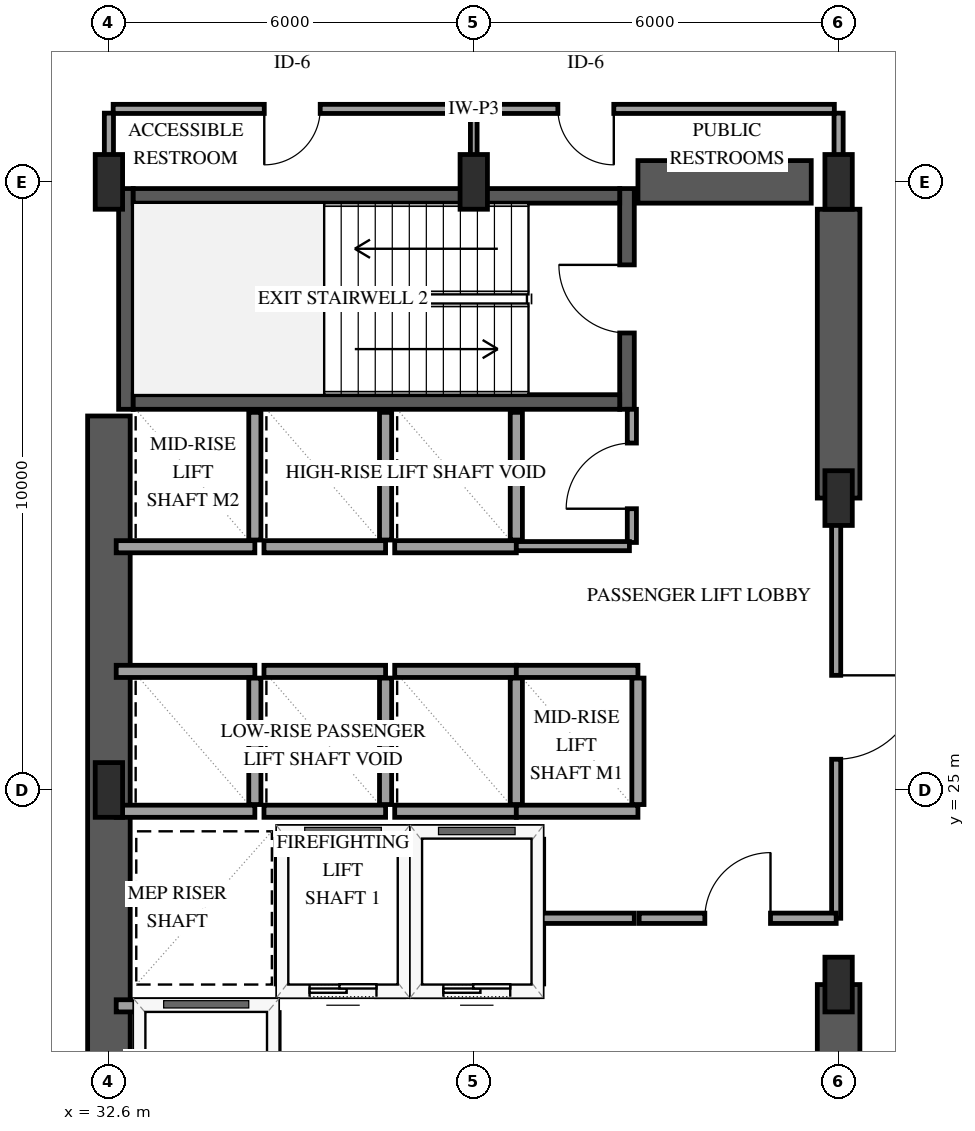
"""IFC4 building model, lengths in metres.
Left out: names, types, materials, properties, quantities, classifications, styles, units other than length and angle.
Written with IfcOpenShell. Run it as: python <this file> out.ifc"""

import sys

from ifc_helpers import new_model, si_unit, direction, frame, frame_2d, origin, origin_2d, place, context, subcontext, project, spatial, rectangle, extrude, element, fill, save


model = new_model("IFC4")
c1 = context("Model", 3, precision=1e-05, world=origin(), true_north=direction((0.0, 1.0)))
c2 = subcontext(c1, "Body", "Model", "MODEL_VIEW")
j1 = project(units=[si_unit("LENGTHUNIT", "METRE"), si_unit("PLANEANGLEUNIT", "RADIAN")], contexts=[c1])
p1 = place(None, origin())
s1 = spatial("IfcSite", under=j1, at=p1, CompositionType="ELEMENT")
p2 = place(p1, origin())
s2 = spatial("IfcBuilding", under=s1, at=p2, CompositionType="ELEMENT")
p3 = place(p2, frame((0.0, 0.0, 16.2)))
s3 = spatial("IfcBuildingStorey", under=s2, at=p3, CompositionType="ELEMENT", Elevation=16.2)
p4 = place(p3, frame((32.88, 31.26, 0.0), z_axis=(0.0, 0.0, 1.0), x_axis=(0.0, 1.0, 0.0)))
e1 = element("IfcWall", 1, at=p4, inside=s3, PredefinedType="SHEAR", context=c2, shape_type="SweptSolid", body=[
    extrude(rectangle(XDim=3.63, YDim=0.24, at=frame_2d((1.815, 0.0))), origin(), (0.0, 0.0, 1.0), 4.5),
])
p5 = place(p3, frame((41.12, 31.26, 0.0), z_axis=(0.0, 0.0, 1.0), x_axis=(0.0, 1.0, 0.0)))
e2 = element("IfcWall", 2, at=p5, inside=s3, PredefinedType="SHEAR", context=c2, shape_type="SweptSolid", body=[
    extrude(rectangle(XDim=3.63, YDim=0.24, at=frame_2d((1.815, 0.0))), origin(), (0.0, 0.0, 1.0), 4.5),
])
p6 = place(p5, frame((1.255, 0.0, 0.0)))
e3 = element("IfcOpeningElement", 3, at=p6, cuts=e2, PredefinedType="OPENING", context=c2, shape_type="SweptSolid", body=[
    extrude(rectangle(XDim=1.12, YDim=2.15, at=frame_2d((0.56, 1.075))), frame((0.0, 0.13, 0.0), z_axis=(0.0, -1.0, 0.0), x_axis=(1.0, 0.0, 0.0)), (0.0, 0.0, 1.0), 0.26),
])
for number, where, z_axis, x_axis in (
    (4, (33.0, 31.38, 0.0), (0.0, 0.0, 1.0), (1.0, 0.0, 0.0)),
    (5, (33.0, 34.77, 0.0), (0.0, 0.0, 1.0), (1.0, 0.0, 0.0)),
):
    element("IfcWall", number, at=place(p3, frame(where, z_axis=z_axis, x_axis=x_axis)), inside=s3, PredefinedType="SHEAR", context=c2, shape_type="SweptSolid", body=[
        extrude(rectangle(XDim=8.0, YDim=0.24, at=frame_2d((4.0, 0.0))), origin(), (0.0, 0.0, 1.0), 4.5),
    ])
p7 = place(p3, frame((32.6, 18.85, 0.0), z_axis=(0.0, 0.0, 1.0), x_axis=(0.0, 1.0, 0.0)))
e6 = element("IfcWall", 6, at=p7, inside=s3, PredefinedType="SHEAR", context=c2, shape_type="SweptSolid", body=[
    extrude(rectangle(XDim=12.3, YDim=0.7, at=frame_2d((6.15, 0.0))), origin(), (0.0, 0.0, 1.0), 4.5),
])
p8 = place(p3, frame((41.3, 35.0, 0.0), z_axis=(0.0, 0.0, 1.0), x_axis=(1.0, 0.0, 0.0)))
e7 = element("IfcWall", 7, at=p8, inside=s3, PredefinedType="SHEAR", context=c2, shape_type="SweptSolid", body=[
    extrude(rectangle(XDim=2.85, YDim=0.7, at=frame_2d((1.425, 0.0))), origin(), (0.0, 0.0, 1.0), 4.5),
])
p9 = place(p3, frame((44.6, 15.45, 0.0), z_axis=(0.0, 0.0, 1.0), x_axis=(0.0, 1.0, 0.0)))
e8 = element("IfcWall", 8, at=p9, inside=s3, PredefinedType="SHEAR", context=c2, shape_type="SweptSolid", body=[
    extrude(rectangle(XDim=6.35, YDim=0.7, at=frame_2d((3.175, 0.0))), origin(), (0.0, 0.0, 1.0), 4.5),
])
p10 = place(p3, frame((44.6, 29.8, 0.0), z_axis=(0.0, 0.0, 1.0), x_axis=(0.0, 1.0, 0.0)))
e9 = element("IfcWall", 9, at=p10, inside=s3, PredefinedType="SHEAR", context=c2, shape_type="SweptSolid", body=[
    extrude(rectangle(XDim=4.75, YDim=0.7, at=frame_2d((2.375, 0.0))), origin(), (0.0, 0.0, 1.0), 4.5),
])
for number, where, z_axis, x_axis in (
    (10, (32.6, 25.0, 0.0), (0.0, 0.0, 1.0), (1.0, 0.0, 0.0)),
    (11, (32.6, 35.0, 0.0), (0.0, 0.0, 1.0), (1.0, 0.0, 0.0)),
    (12, (38.6, 35.0, 0.0), (0.0, 0.0, 1.0), (1.0, 0.0, 0.0)),
    (13, (44.6, 21.8, 0.0), (0.0, 0.0, 1.0), (1.0, 0.0, 0.0)),
    (14, (44.6, 29.8, 0.0), (0.0, 0.0, 1.0), (1.0, 0.0, 0.0)),
    (15, (44.6, 35.0, 0.0), (0.0, 0.0, 1.0), (1.0, 0.0, 0.0)),
):
    element("IfcColumn", number, at=place(p3, frame(where, z_axis=z_axis, x_axis=x_axis)), inside=s3, PredefinedType="PILASTER", context=c2, shape_type="SweptSolid", body=[
        extrude(rectangle(XDim=0.45, YDim=0.9, at=origin_2d()), origin(), (0.0, 0.0, 1.0), 4.5),
    ])
p11 = place(p3, frame((35.45, 21.7, 0.0), z_axis=(0.0, 0.0, 1.0), x_axis=(1.0, 0.0, 0.0)))
e16 = element("IfcWall", 16, at=p11, inside=s3, PredefinedType="SOLIDWALL", context=c2, shape_type="SweptSolid", body=[
    extrude(rectangle(XDim=2.0, YDim=0.2, at=frame_2d((1.0, 0.0))), origin(), (0.0, 0.0, 1.0), 4.18),
])
p12 = place(p11, frame((0.45, 0.0, 0.0)))
e17 = element("IfcOpeningElement", 17, at=p12, cuts=e16, PredefinedType="OPENING", context=c2, shape_type="SweptSolid", body=[
    extrude(rectangle(XDim=1.1, YDim=2.15, at=frame_2d((0.55, 1.075))), frame((0.0, 0.11, 0.0), z_axis=(0.0, -1.0, 0.0), x_axis=(1.0, 0.0, 0.0)), (0.0, 0.0, 1.0), 0.22),
])
p13 = place(p3, frame((35.45, 24.3, 0.0), z_axis=(0.0, 0.0, 1.0), x_axis=(1.0, 0.0, 0.0)))
e18 = element("IfcWall", 18, at=p13, inside=s3, PredefinedType="SOLIDWALL", context=c2, shape_type="SweptSolid", body=[
    extrude(rectangle(XDim=2.0, YDim=0.2, at=frame_2d((1.0, 0.0))), origin(), (0.0, 0.0, 1.0), 4.18),
])
for number, where, z_axis, x_axis in (
    (19, (35.45, 21.81, 0.0), (0.0, 0.0, 1.0), (0.0, 1.0, 0.0)),
    (20, (37.45, 21.81, 0.0), (0.0, 0.0, 1.0), (0.0, 1.0, 0.0)),
):
    element("IfcWall", number, at=place(p3, frame(where, z_axis=z_axis, x_axis=x_axis)), inside=s3, PredefinedType="SOLIDWALL", context=c2, shape_type="SweptSolid", body=[
        extrude(rectangle(XDim=2.38, YDim=0.2, at=frame_2d((1.19, 0.0))), origin(), (0.0, 0.0, 1.0), 4.18),
    ])
p14 = place(p3, frame((37.65, 21.7, 0.0), z_axis=(0.0, 0.0, 1.0), x_axis=(1.0, 0.0, 0.0)))
e21 = element("IfcWall", 21, at=p14, inside=s3, PredefinedType="SOLIDWALL", context=c2, shape_type="SweptSolid", body=[
    extrude(rectangle(XDim=2.0, YDim=0.2, at=frame_2d((1.0, 0.0))), origin(), (0.0, 0.0, 1.0), 4.18),
])
p15 = place(p14, frame((0.45, 0.0, 0.0)))
e22 = element("IfcOpeningElement", 22, at=p15, cuts=e21, PredefinedType="OPENING", context=c2, shape_type="SweptSolid", body=[
    extrude(rectangle(XDim=1.1, YDim=2.15, at=frame_2d((0.55, 1.075))), frame((0.0, 0.11, 0.0), z_axis=(0.0, -1.0, 0.0), x_axis=(1.0, 0.0, 0.0)), (0.0, 0.0, 1.0), 0.22),
])
p16 = place(p3, frame((37.65, 24.3, 0.0), z_axis=(0.0, 0.0, 1.0), x_axis=(1.0, 0.0, 0.0)))
e23 = element("IfcWall", 23, at=p16, inside=s3, PredefinedType="SOLIDWALL", context=c2, shape_type="SweptSolid", body=[
    extrude(rectangle(XDim=2.0, YDim=0.2, at=frame_2d((1.0, 0.0))), origin(), (0.0, 0.0, 1.0), 4.18),
])
p17 = place(p3, frame((39.65, 21.81, 0.0), z_axis=(0.0, 0.0, 1.0), x_axis=(0.0, 1.0, 0.0)))
e24 = element("IfcWall", 24, at=p17, inside=s3, PredefinedType="SOLIDWALL", context=c2, shape_type="SweptSolid", body=[
    extrude(rectangle(XDim=2.38, YDim=0.2, at=frame_2d((1.19, 0.0))), origin(), (0.0, 0.0, 1.0), 4.18),
])
p18 = place(p3, frame((32.72, 21.45, 0.0), z_axis=(0.0, 0.0, 1.0), x_axis=(1.0, 0.0, 0.0)))
e25 = element("IfcWall", 25, at=p18, inside=s3, PredefinedType="SOLIDWALL", context=c2, shape_type="SweptSolid", body=[
    extrude(rectangle(XDim=2.58, YDim=0.2, at=frame_2d((1.29, 0.0))), origin(), (0.0, 0.0, 1.0), 4.18),
])
p19 = place(p3, frame((35.3, 18.79, 0.0), z_axis=(0.0, 0.0, 1.0), x_axis=(0.0, 1.0, 0.0)))
e26 = element("IfcWall", 26, at=p19, inside=s3, PredefinedType="SOLIDWALL", context=c2, shape_type="SweptSolid", body=[
    extrude(rectangle(XDim=2.55, YDim=0.2, at=frame_2d((1.275, 0.0))), origin(), (0.0, 0.0, 1.0), 4.18),
])
p20 = place(p19, frame((0.725, 0.0, 0.0)))
e27 = element("IfcOpeningElement", 27, at=p20, cuts=e26, PredefinedType="OPENING", context=c2, shape_type="SweptSolid", body=[
    extrude(rectangle(XDim=1.1, YDim=2.15, at=frame_2d((0.55, 1.075))), frame((0.0, 0.11, 0.0), z_axis=(0.0, -1.0, 0.0), x_axis=(1.0, 0.0, 0.0)), (0.0, 0.0, 1.0), 0.22),
])
for number, where, z_axis, x_axis in (
    (28, (32.72, 24.65, 0.0), (0.0, 0.0, 1.0), (1.0, 0.0, 0.0)),
    (29, (32.72, 26.95, 0.0), (0.0, 0.0, 1.0), (1.0, 0.0, 0.0)),
):
    element("IfcWall", number, at=place(p3, frame(where, z_axis=z_axis, x_axis=x_axis)), inside=s3, PredefinedType="SOLIDWALL", context=c2, shape_type="SweptSolid", body=[
        extrude(rectangle(XDim=2.28, YDim=0.2, at=frame_2d((1.14, 0.0))), origin(), (0.0, 0.0, 1.0), 4.18),
    ])
p21 = place(p3, frame((35.0, 24.76, 0.0), z_axis=(0.0, 0.0, 1.0), x_axis=(0.0, 1.0, 0.0)))
e30 = element("IfcWall", 30, at=p21, inside=s3, PredefinedType="SOLIDWALL", context=c2, shape_type="SweptSolid", body=[
    extrude(rectangle(XDim=2.08, YDim=0.2, at=frame_2d((1.04, 0.0))), origin(), (0.0, 0.0, 1.0), 4.18),
])
for number, where, z_axis, x_axis in (
    (31, (35.15, 24.65, 0.0), (0.0, 0.0, 1.0), (1.0, 0.0, 0.0)),
    (32, (35.15, 26.95, 0.0), (0.0, 0.0, 1.0), (1.0, 0.0, 0.0)),
):
    element("IfcWall", number, at=place(p3, frame(where, z_axis=z_axis, x_axis=x_axis)), inside=s3, PredefinedType="SOLIDWALL", context=c2, shape_type="SweptSolid", body=[
        extrude(rectangle(XDim=2.0, YDim=0.2, at=frame_2d((1.0, 0.0))), origin(), (0.0, 0.0, 1.0), 4.18),
    ])
p22 = place(p3, frame((37.15, 24.76, 0.0), z_axis=(0.0, 0.0, 1.0), x_axis=(0.0, 1.0, 0.0)))
e33 = element("IfcWall", 33, at=p22, inside=s3, PredefinedType="SOLIDWALL", context=c2, shape_type="SweptSolid", body=[
    extrude(rectangle(XDim=2.08, YDim=0.2, at=frame_2d((1.04, 0.0))), origin(), (0.0, 0.0, 1.0), 4.18),
])
for number, where, z_axis, x_axis in (
    (34, (37.3, 24.65, 0.0), (0.0, 0.0, 1.0), (1.0, 0.0, 0.0)),
    (35, (37.3, 26.95, 0.0), (0.0, 0.0, 1.0), (1.0, 0.0, 0.0)),
):
    element("IfcWall", number, at=place(p3, frame(where, z_axis=z_axis, x_axis=x_axis)), inside=s3, PredefinedType="SOLIDWALL", context=c2, shape_type="SweptSolid", body=[
        extrude(rectangle(XDim=2.0, YDim=0.2, at=frame_2d((1.0, 0.0))), origin(), (0.0, 0.0, 1.0), 4.18),
    ])
p23 = place(p3, frame((39.3, 24.76, 0.0), z_axis=(0.0, 0.0, 1.0), x_axis=(0.0, 1.0, 0.0)))
e36 = element("IfcWall", 36, at=p23, inside=s3, PredefinedType="SOLIDWALL", context=c2, shape_type="SweptSolid", body=[
    extrude(rectangle(XDim=2.08, YDim=0.2, at=frame_2d((1.04, 0.0))), origin(), (0.0, 0.0, 1.0), 4.18),
])
for number, where, z_axis, x_axis in (
    (37, (39.3, 24.65, 0.0), (0.0, 0.0, 1.0), (1.0, 0.0, 0.0)),
    (38, (39.3, 26.95, 0.0), (0.0, 0.0, 1.0), (1.0, 0.0, 0.0)),
):
    element("IfcWall", number, at=place(p3, frame(where, z_axis=z_axis, x_axis=x_axis)), inside=s3, PredefinedType="SOLIDWALL", context=c2, shape_type="SweptSolid", body=[
        extrude(rectangle(XDim=2.0, YDim=0.2, at=frame_2d((1.0, 0.0))), origin(), (0.0, 0.0, 1.0), 4.18),
    ])
p24 = place(p3, frame((41.3, 24.76, 0.0), z_axis=(0.0, 0.0, 1.0), x_axis=(0.0, 1.0, 0.0)))
e39 = element("IfcWall", 39, at=p24, inside=s3, PredefinedType="SOLIDWALL", context=c2, shape_type="SweptSolid", body=[
    extrude(rectangle(XDim=2.08, YDim=0.2, at=frame_2d((1.04, 0.0))), origin(), (0.0, 0.0, 1.0), 4.18),
])
p25 = place(p3, frame((32.72, 29.0, 0.0), z_axis=(0.0, 0.0, 1.0), x_axis=(1.0, 0.0, 0.0)))
e40 = element("IfcWall", 40, at=p25, inside=s3, PredefinedType="SOLIDWALL", context=c2, shape_type="SweptSolid", body=[
    extrude(rectangle(XDim=2.28, YDim=0.2, at=frame_2d((1.14, 0.0))), origin(), (0.0, 0.0, 1.0), 4.18),
])
p26 = place(p3, frame((35.0, 29.11, 0.0), z_axis=(0.0, 0.0, 1.0), x_axis=(0.0, 1.0, 0.0)))
e41 = element("IfcWall", 41, at=p26, inside=s3, PredefinedType="SOLIDWALL", context=c2, shape_type="SweptSolid", body=[
    extrude(rectangle(XDim=2.1, YDim=0.2, at=frame_2d((1.05, 0.0))), origin(), (0.0, 0.0, 1.0), 4.18),
])
p27 = place(p3, frame((35.15, 29.0, 0.0), z_axis=(0.0, 0.0, 1.0), x_axis=(1.0, 0.0, 0.0)))
e42 = element("IfcWall", 42, at=p27, inside=s3, PredefinedType="SOLIDWALL", context=c2, shape_type="SweptSolid", body=[
    extrude(rectangle(XDim=2.0, YDim=0.2, at=frame_2d((1.0, 0.0))), origin(), (0.0, 0.0, 1.0), 4.18),
])
p28 = place(p3, frame((37.15, 29.11, 0.0), z_axis=(0.0, 0.0, 1.0), x_axis=(0.0, 1.0, 0.0)))
e43 = element("IfcWall", 43, at=p28, inside=s3, PredefinedType="SOLIDWALL", context=c2, shape_type="SweptSolid", body=[
    extrude(rectangle(XDim=2.1, YDim=0.2, at=frame_2d((1.05, 0.0))), origin(), (0.0, 0.0, 1.0), 4.18),
])
p29 = place(p3, frame((37.3, 29.0, 0.0), z_axis=(0.0, 0.0, 1.0), x_axis=(1.0, 0.0, 0.0)))
e44 = element("IfcWall", 44, at=p29, inside=s3, PredefinedType="SOLIDWALL", context=c2, shape_type="SweptSolid", body=[
    extrude(rectangle(XDim=2.0, YDim=0.2, at=frame_2d((1.0, 0.0))), origin(), (0.0, 0.0, 1.0), 4.18),
])
p30 = place(p3, frame((39.3, 29.11, 0.0), z_axis=(0.0, 0.0, 1.0), x_axis=(0.0, 1.0, 0.0)))
e45 = element("IfcWall", 45, at=p30, inside=s3, PredefinedType="SOLIDWALL", context=c2, shape_type="SweptSolid", body=[
    extrude(rectangle(XDim=2.1, YDim=0.2, at=frame_2d((1.05, 0.0))), origin(), (0.0, 0.0, 1.0), 4.18),
])
p31 = place(p3, frame((44.56, 29.8, 0.0), z_axis=(0.0, 0.0, 1.0), x_axis=(0.0, -1.0, 0.0)))
e46 = element("IfcWall", 46, at=p31, inside=s3, PredefinedType="PARTITIONING", context=c2, shape_type="SweptSolid", body=[
    extrude(rectangle(XDim=6.91, YDim=0.15, at=frame_2d((3.455, 0.0))), origin(), (0.0, 0.0, 1.0), 3.22),
])
p32 = place(p31, frame((2.915, 0.0, 0.0)))
e47 = element("IfcOpeningElement", 47, at=p32, cuts=e46, PredefinedType="OPENING", context=c2, shape_type="SweptSolid", body=[
    extrude(rectangle(XDim=1.38, YDim=2.2, at=frame_2d((0.69, 1.1))), frame((0.0, 0.085, 0.0), z_axis=(0.0, -1.0, 0.0), x_axis=(1.0, 0.0, 0.0)), (0.0, 0.0, 1.0), 0.17),
])
p33 = place(p3, frame((38.53, 36.2, 0.0), z_axis=(0.0, 0.0, 1.0), x_axis=(-1.0, 0.0, 0.0)))
e48 = element("IfcWall", 48, at=p33, inside=s3, PredefinedType="PARTITIONING", context=c2, shape_type="SweptSolid", body=[
    extrude(rectangle(XDim=5.86, YDim=0.15, at=frame_2d((2.93, 0.0))), origin(), (0.0, 0.0, 1.0), 4.18),
])
p34 = place(p33, frame((2.455, 0.0, 0.0)))
e49 = element("IfcOpeningElement", 49, at=p34, cuts=e48, PredefinedType="OPENING", context=c2, shape_type="SweptSolid", body=[
    extrude(rectangle(XDim=0.92, YDim=2.12, at=frame_2d((0.46, 1.06))), frame((0.0, 0.085, 0.0), z_axis=(0.0, -1.0, 0.0), x_axis=(1.0, 0.0, 0.0)), (0.0, 0.0, 1.0), 0.17),
])
p35 = place(p3, frame((44.53, 36.2, 0.0), z_axis=(0.0, 0.0, 1.0), x_axis=(-1.0, 0.0, 0.0)))
e50 = element("IfcWall", 50, at=p35, inside=s3, PredefinedType="PARTITIONING", context=c2, shape_type="SweptSolid", body=[
    extrude(rectangle(XDim=5.86, YDim=0.15, at=frame_2d((2.93, 0.0))), origin(), (0.0, 0.0, 1.0), 4.18),
])
p36 = place(p35, frame((3.627, 0.0, 0.0)))
e51 = element("IfcOpeningElement", 51, at=p36, cuts=e50, PredefinedType="OPENING", context=c2, shape_type="SweptSolid", body=[
    extrude(rectangle(XDim=0.92, YDim=2.12, at=frame_2d((0.46, 1.06))), frame((0.0, 0.085, 0.0), z_axis=(0.0, -1.0, 0.0), x_axis=(1.0, 0.0, 0.0)), (0.0, 0.0, 1.0), 0.17),
])
p37 = place(p3, frame((41.32, 22.89, 0.0), z_axis=(0.0, 0.0, 1.0), x_axis=(1.0, 0.0, 0.0)))
e52 = element("IfcWall", 52, at=p37, inside=s3, PredefinedType="PARTITIONING", context=c2, shape_type="SweptSolid", body=[
    extrude(rectangle(XDim=3.24, YDim=0.17, at=frame_2d((1.62, 0.0))), origin(), (0.0, 0.0, 1.0), 4.18),
])
p38 = place(p37, frame((1.08, 0.0, 0.0)))
e53 = element("IfcOpeningElement", 53, at=p38, cuts=e52, PredefinedType="OPENING", context=c2, shape_type="SweptSolid", body=[
    extrude(rectangle(XDim=1.08, YDim=2.15, at=frame_2d((0.54, 1.075))), frame((0.0, 0.095, 0.0), z_axis=(0.0, -1.0, 0.0), x_axis=(1.0, 0.0, 0.0)), (0.0, 0.0, 1.0), 0.19),
])
p39 = place(p3, frame((41.2, 29.07, 0.0), z_axis=(0.0, 0.0, 1.0), x_axis=(0.0, 1.0, 0.0)))
e54 = element("IfcWall", 54, at=p39, inside=s3, PredefinedType="PARTITIONING", context=c2, shape_type="SweptSolid", body=[
    extrude(rectangle(XDim=2.19, YDim=0.15, at=frame_2d((1.095, 0.0))), origin(), (0.0, 0.0, 1.0), 4.18),
])
p40 = place(p39, frame((0.555, 0.0, 0.0)))
e55 = element("IfcOpeningElement", 55, at=p40, cuts=e54, PredefinedType="OPENING", context=c2, shape_type="SweptSolid", body=[
    extrude(rectangle(XDim=1.08, YDim=2.15, at=frame_2d((0.54, 1.075))), frame((0.0, 0.085, 0.0), z_axis=(0.0, -1.0, 0.0), x_axis=(1.0, 0.0, 0.0)), (0.0, 0.0, 1.0), 0.17),
])
p41 = place(p3, frame((39.3, 29.01, 0.0), z_axis=(0.0, 0.0, 1.0), x_axis=(1.0, 0.0, 0.0)))
e56 = element("IfcWall", 56, at=p41, inside=s3, PredefinedType="PARTITIONING", context=c2, shape_type="SweptSolid", body=[
    extrude(rectangle(XDim=1.86, YDim=0.15, at=frame_2d((0.93, 0.0))), origin(), (0.0, 0.0, 1.0), 4.18),
])
p42 = place(p3, frame((39.72, 22.89, 0.0), z_axis=(0.0, 0.0, 1.0), x_axis=(1.0, 0.0, 0.0)))
e57 = element("IfcWall", 57, at=p42, inside=s3, PredefinedType="PARTITIONING", context=c2, shape_type="SweptSolid", body=[
    extrude(rectangle(XDim=1.52, YDim=0.17, at=frame_2d((0.76, 0.0))), origin(), (0.0, 0.0, 1.0), 4.18),
])
for number, where, z_axis, x_axis in (
    (58, (32.6, 36.13, 0.0), (0.0, 0.0, 1.0), (0.0, -1.0, 0.0)),
    (59, (44.6, 35.07, 0.0), (0.0, 0.0, 1.0), (0.0, 1.0, 0.0)),
):
    element("IfcWall", number, at=place(p3, frame(where, z_axis=z_axis, x_axis=x_axis)), inside=s3, PredefinedType="PARTITIONING", context=c2, shape_type="SweptSolid", body=[
        extrude(rectangle(XDim=1.06, YDim=0.15, at=frame_2d((0.53, 0.0))), origin(), (0.0, 0.0, 1.0), 3.302),
    ])
p43 = place(p3, frame((38.6, 36.13, 0.0), z_axis=(0.0, 0.0, 1.0), x_axis=(0.0, -1.0, 0.0)))
e60 = element("IfcWall", 60, at=p43, inside=s3, PredefinedType="PARTITIONING", context=c2, shape_type="SweptSolid", body=[
    extrude(rectangle(XDim=1.06, YDim=0.11, at=frame_2d((0.53, 0.0))), origin(), (0.0, 0.0, 1.0), 4.18),
])
p44 = place(p12, origin())
e61 = element("IfcDoor", 61, at=p44, inside=s3, OperationType="SLIDING_TO_LEFT", PredefinedType="DOOR", context=c2, shape_type="SweptSolid", body=[
    extrude(rectangle(XDim=1.1, YDim=2.15, at=frame_2d((0.55, 1.075))), frame((0.0, 0.025, 0.0), z_axis=(0.0, -1.0, 0.0), x_axis=(1.0, 0.0, 0.0)), (0.0, 0.0, 1.0), 0.05),
])
fill(e17, e61)
p45 = place(p15, origin())
e62 = element("IfcDoor", 62, at=p45, inside=s3, OperationType="SLIDING_TO_LEFT", PredefinedType="DOOR", context=c2, shape_type="SweptSolid", body=[
    extrude(rectangle(XDim=1.1, YDim=2.15, at=frame_2d((0.55, 1.075))), frame((0.0, 0.025, 0.0), z_axis=(0.0, -1.0, 0.0), x_axis=(1.0, 0.0, 0.0)), (0.0, 0.0, 1.0), 0.05),
])
fill(e22, e62)
p46 = place(p6, origin())
e63 = element("IfcDoor", 63, at=p46, inside=s3, OperationType="SINGLE_SWING_RIGHT", PredefinedType="DOOR", context=c2, shape_type="SweptSolid", body=[
    extrude(rectangle(XDim=1.12, YDim=2.15, at=frame_2d((0.56, 1.075))), frame((0.0, 0.025, 0.0), z_axis=(0.0, -1.0, 0.0), x_axis=(1.0, 0.0, 0.0)), (0.0, 0.0, 1.0), 0.05),
])
fill(e3, e63)
p47 = place(p32, origin())
e64 = element("IfcDoor", 64, at=p47, inside=s3, OperationType="SINGLE_SWING_LEFT", PredefinedType="DOOR", context=c2, shape_type="SweptSolid", body=[
    extrude(rectangle(XDim=1.38, YDim=2.2, at=frame_2d((0.69, 1.1))), frame((0.0, 0.025, 0.0), z_axis=(0.0, -1.0, 0.0), x_axis=(1.0, 0.0, 0.0)), (0.0, 0.0, 1.0), 0.05),
])
fill(e47, e64)
p48 = place(p34, origin())
e65 = element("IfcDoor", 65, at=p48, inside=s3, OperationType="SINGLE_SWING_RIGHT", PredefinedType="DOOR", context=c2, shape_type="SweptSolid", body=[
    extrude(rectangle(XDim=0.92, YDim=2.12, at=frame_2d((0.46, 1.06))), frame((0.0, 0.025, 0.0), z_axis=(0.0, -1.0, 0.0), x_axis=(1.0, 0.0, 0.0)), (0.0, 0.0, 1.0), 0.05),
])
fill(e49, e65)
p49 = place(p36, origin())
e66 = element("IfcDoor", 66, at=p49, inside=s3, OperationType="SINGLE_SWING_LEFT", PredefinedType="DOOR", context=c2, shape_type="SweptSolid", body=[
    extrude(rectangle(XDim=0.92, YDim=2.12, at=frame_2d((0.46, 1.06))), frame((0.0, 0.025, 0.0), z_axis=(0.0, -1.0, 0.0), x_axis=(1.0, 0.0, 0.0)), (0.0, 0.0, 1.0), 0.05),
])
fill(e51, e66)
p50 = place(p38, origin())
e67 = element("IfcDoor", 67, at=p50, inside=s3, OperationType="SINGLE_SWING_RIGHT", PredefinedType="DOOR", context=c2, shape_type="SweptSolid", body=[
    extrude(rectangle(XDim=1.08, YDim=2.15, at=frame_2d((0.54, 1.075))), frame((0.0, 0.025, 0.0), z_axis=(0.0, -1.0, 0.0), x_axis=(1.0, 0.0, 0.0)), (0.0, 0.0, 1.0), 0.05),
])
fill(e53, e67)
p51 = place(p40, origin())
e68 = element("IfcDoor", 68, at=p51, inside=s3, OperationType="SINGLE_SWING_LEFT", PredefinedType="DOOR", context=c2, shape_type="SweptSolid", body=[
    extrude(rectangle(XDim=1.08, YDim=2.15, at=frame_2d((0.54, 1.075))), frame((0.0, 0.025, 0.0), z_axis=(0.0, -1.0, 0.0), x_axis=(1.0, 0.0, 0.0)), (0.0, 0.0, 1.0), 0.05),
])
fill(e55, e68)
save(model, sys.argv[1])
